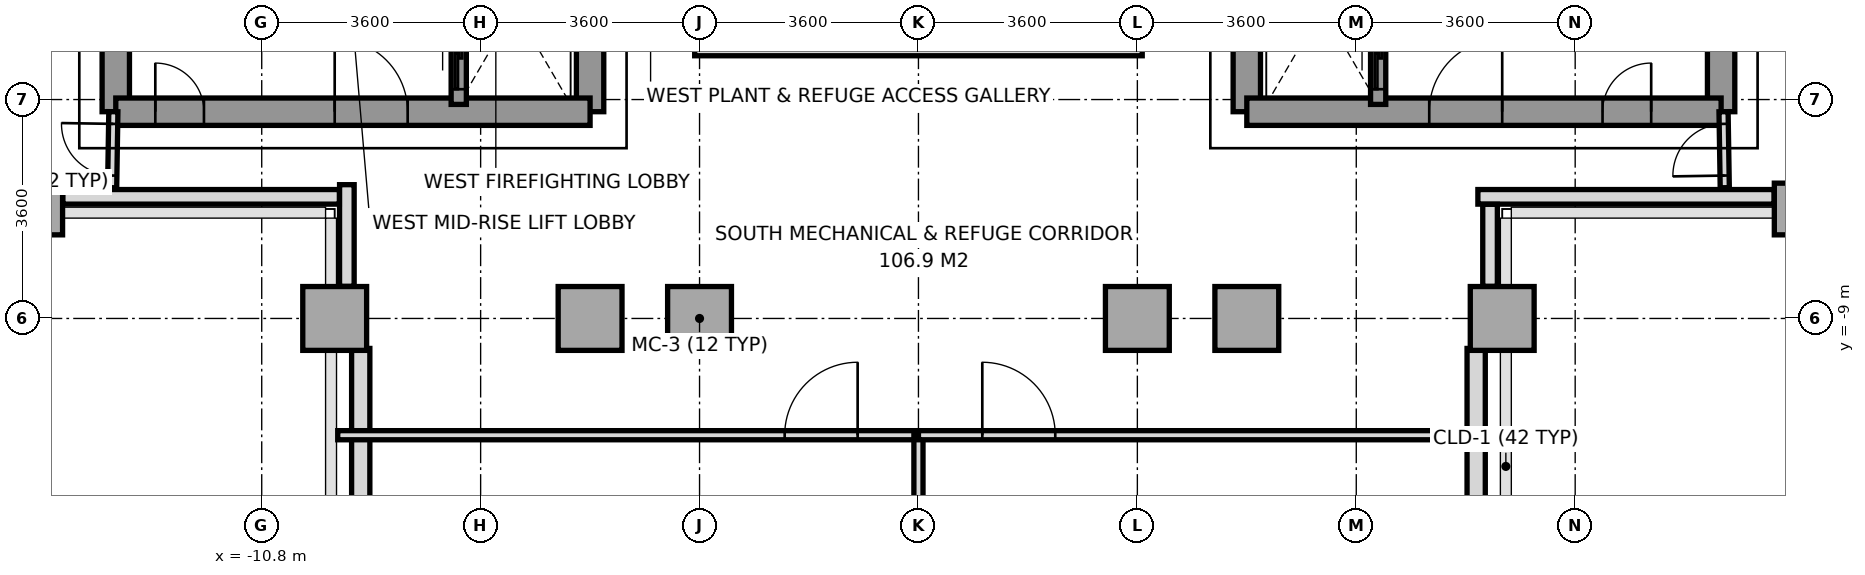
"""IFC4 building model, lengths in metres.
Left out: names, types, materials, properties, quantities, classifications, styles, units other than length and angle.
Written with IfcOpenShell. Run it as: python <this file> out.ifc"""

import sys

from ifc_helpers import new_model, si_unit, direction, frame, frame_2d, origin, origin_2d, place, context, subcontext, project, spatial, rectangle, extrude, source, transform, mapped, element, fill, save


model = new_model("IFC4")
c1 = context("Model", 3, precision=1e-05, world=origin(), true_north=direction((0.0, 1.0)))
c2 = subcontext(c1, "Body", "Model", "MODEL_VIEW")
j1 = project(units=[si_unit("LENGTHUNIT", "METRE"), si_unit("PLANEANGLEUNIT", "RADIAN")], contexts=[c1])
p1 = place(None, origin())
s1 = spatial("IfcSite", under=j1, at=p1, CompositionType="ELEMENT")
p2 = place(p1, origin())
s2 = spatial("IfcBuilding", under=s1, at=p2, CompositionType="ELEMENT")
p3 = place(p2, frame((0.0, 0.0, 151.6)))
s3 = spatial("IfcBuildingStorey", under=s2, at=p3, CompositionType="ELEMENT", Elevation=151.6)
m1 = source(origin(), c2, "Body", "SweptSolid", [
    extrude(rectangle(XDim=0.65, YDim=0.85, at=origin_2d()), origin(), (0.0, 0.0, 1.0), 4.4),
])
p4 = place(p3, frame((-14.4, -7.2, 0.0), z_axis=(0.0, 0.0, 1.0), x_axis=(1.0, 0.0, 0.0)))
e1 = element("IfcColumn", 1, at=p4, inside=s3, PredefinedType="COLUMN", context=c2, shape_type="MappedRepresentation", body=[
    mapped(m1, transform((0.0, 0.0, 0.0), x_axis=(1.0, 0.0, 0.0), y_axis=(0.0, 1.0, 0.0), z_axis=(0.0, 0.0, 1.0), scale=1.0)),
])
m2 = source(origin(), c2, "Body", "SweptSolid", [
    extrude(rectangle(XDim=1.05, YDim=1.05, at=origin_2d()), origin(), (0.0, 0.0, 1.0), 4.4),
])
for number, where, z_axis, x_axis in (
    (2, (-9.6, -9.0, 0.0), (0.0, 0.0, 1.0), (1.0, 0.0, 0.0)),
    (3, (-5.4, -9.0, 0.0), (0.0, 0.0, 1.0), (1.0, 0.0, 0.0)),
    (4, (-3.6, -9.0, 0.0), (0.0, 0.0, 1.0), (1.0, 0.0, 0.0)),
    (5, (3.6, -9.0, 0.0), (0.0, 0.0, 1.0), (1.0, 0.0, 0.0)),
    (6, (5.4, -9.0, 0.0), (0.0, 0.0, 1.0), (1.0, 0.0, 0.0)),
    (7, (9.6, -9.0, 0.0), (0.0, 0.0, 1.0), (1.0, 0.0, 0.0)),
):
    element("IfcColumn", number, at=place(p3, frame(where, z_axis=z_axis, x_axis=x_axis)), inside=s3, PredefinedType="COLUMN", context=c2, shape_type="MappedRepresentation", body=[
        mapped(m2, transform((0.0, 0.0, 0.0), x_axis=(1.0, 0.0, 0.0), y_axis=(0.0, 1.0, 0.0), z_axis=(0.0, 0.0, 1.0), scale=1.0)),
    ])
p5 = place(p3, frame((14.4, -7.2, 0.0), z_axis=(0.0, 0.0, 1.0), x_axis=(1.0, 0.0, 0.0)))
e8 = element("IfcColumn", 8, at=p5, inside=s3, PredefinedType="COLUMN", context=c2, shape_type="MappedRepresentation", body=[
    mapped(m1, transform((0.0, 0.0, 0.0), x_axis=(1.0, 0.0, 0.0), y_axis=(0.0, 1.0, 0.0), z_axis=(0.0, 0.0, 1.0), scale=1.0)),
])
for number, where, z_axis, x_axis in (
    (9, (-9.172, -9.493, 0.0), (0.0, 0.0, 1.0), (0.0, -1.0, 0.0)),
    (10, (9.172, -15.63, 0.0), (0.0, 0.0, 1.0), (0.0, 1.0, 0.0)),
):
    element("IfcWall", number, at=place(p3, frame(where, z_axis=z_axis, x_axis=x_axis)), inside=s3, PredefinedType="SOLIDWALL", context=c2, shape_type="SweptSolid", body=[
        extrude(rectangle(XDim=6.137, YDim=0.3, at=frame_2d((3.068, 0.0))), origin(), (0.0, 0.0, 1.0), 4.4),
    ])
p6 = place(p3, frame((14.072, -7.0, 0.0), z_axis=(0.0, 0.0, 1.0), x_axis=(-1.0, 0.0, 0.0)))
e11 = element("IfcWall", 11, at=p6, inside=s3, PredefinedType="PARAPET", context=c2, shape_type="SweptSolid", body=[
    extrude(rectangle(XDim=4.872, YDim=0.24, at=frame_2d((2.436, 0.0))), origin(), (0.0, 0.0, 1.0), 1.15),
])
p7 = place(p3, frame((9.4, -7.123, 0.0), z_axis=(0.0, 0.0, 1.0), x_axis=(0.0, -1.0, 0.0)))
e12 = element("IfcWall", 12, at=p7, inside=s3, PredefinedType="PARAPET", context=c2, shape_type="SweptSolid", body=[
    extrude(rectangle(XDim=1.349, YDim=0.24, at=frame_2d((0.674, 0.0))), origin(), (0.0, 0.0, 1.0), 1.15),
])
p8 = place(p3, frame((-9.4, -8.472, 0.0), z_axis=(0.0, 0.0, 1.0), x_axis=(0.0, 1.0, 0.0)))
e13 = element("IfcWall", 13, at=p8, inside=s3, PredefinedType="PARAPET", context=c2, shape_type="SweptSolid", body=[
    extrude(rectangle(XDim=1.672, YDim=0.24, at=frame_2d((0.836, 0.0))), origin(), (0.0, 0.0, 1.0), 1.15),
])
p9 = place(p3, frame((-9.523, -7.0, 0.0), z_axis=(0.0, 0.0, 1.0), x_axis=(-1.0, 0.0, 0.0)))
e14 = element("IfcWall", 14, at=p9, inside=s3, PredefinedType="PARAPET", context=c2, shape_type="SweptSolid", body=[
    extrude(rectangle(XDim=4.549, YDim=0.24, at=frame_2d((2.274, 0.0))), origin(), (0.0, 0.0, 1.0), 1.15),
])
p10 = place(p3, frame((-13.2, -5.6, 0.0), z_axis=(0.0, 0.0, 1.0), x_axis=(0.0, 1.0, 0.0)))
e15 = element("IfcWall", 15, at=p10, inside=s3, PredefinedType="SHEAR", context=c2, shape_type="SweptSolid", body=[
    extrude(rectangle(XDim=11.2, YDim=0.45, at=frame_2d((5.6, 0.0))), origin(), (0.0, 0.0, 1.0), 4.4),
])
p11 = place(p3, frame((-5.4, -5.6, 0.0), z_axis=(0.0, 0.0, 1.0), x_axis=(0.0, 1.0, 0.0)))
e16 = element("IfcWall", 16, at=p11, inside=s3, PredefinedType="SHEAR", context=c2, shape_type="SweptSolid", body=[
    extrude(rectangle(XDim=12.5, YDim=0.45, at=frame_2d((6.25, 0.0))), origin(), (0.0, 0.0, 1.0), 4.4),
])
p12 = place(p11, frame((4.55, 0.0, 0.0)))
e17 = element("IfcOpeningElement", 17, at=p12, cuts=e16, PredefinedType="OPENING", context=c2, shape_type="SweptSolid", body=[
    extrude(rectangle(XDim=1.2, YDim=2.2, at=frame_2d((0.6, 1.1))), frame((0.0, 0.235, 0.0), z_axis=(0.0, -1.0, 0.0), x_axis=(1.0, 0.0, 0.0)), (0.0, 0.0, 1.0), 0.47),
])
p13 = place(p11, frame((6.86, 0.0, 0.0)))
e18 = element("IfcOpeningElement", 18, at=p13, cuts=e16, PredefinedType="OPENING", context=c2, shape_type="SweptSolid", body=[
    extrude(rectangle(XDim=0.8, YDim=2.1, at=frame_2d((0.4, 1.05))), frame((0.0, 0.235, 0.0), z_axis=(0.0, -1.0, 0.0), x_axis=(1.0, 0.0, 0.0)), (0.0, 0.0, 1.0), 0.47),
])
p14 = place(p11, frame((7.88, 0.0, 0.0)))
e19 = element("IfcOpeningElement", 19, at=p14, cuts=e16, PredefinedType="OPENING", context=c2, shape_type="SweptSolid", body=[
    extrude(rectangle(XDim=0.8, YDim=2.1, at=frame_2d((0.4, 1.05))), frame((0.0, 0.235, 0.0), z_axis=(0.0, -1.0, 0.0), x_axis=(1.0, 0.0, 0.0)), (0.0, 0.0, 1.0), 0.47),
])
p15 = place(p3, frame((-13.2, -5.6, 0.0), z_axis=(0.0, 0.0, 1.0), x_axis=(1.0, 0.0, 0.0)))
e20 = element("IfcWall", 20, at=p15, inside=s3, PredefinedType="SHEAR", context=c2, shape_type="SweptSolid", body=[
    extrude(rectangle(XDim=7.8, YDim=0.45, at=frame_2d((3.9, 0.0))), origin(), (0.0, 0.0, 1.0), 4.4),
])
p16 = place(p15, frame((3.6, 0.0, 0.0)))
e21 = element("IfcOpeningElement", 21, at=p16, cuts=e20, PredefinedType="OPENING", context=c2, shape_type="SweptSolid", body=[
    extrude(rectangle(XDim=1.2, YDim=2.2, at=frame_2d((0.6, 1.1))), frame((0.0, 0.235, 0.0), z_axis=(0.0, -1.0, 0.0), x_axis=(1.0, 0.0, 0.0)), (0.0, 0.0, 1.0), 0.47),
])
p17 = place(p15, frame((0.65, 0.0, 0.0)))
e22 = element("IfcOpeningElement", 22, at=p17, cuts=e20, PredefinedType="OPENING", context=c2, shape_type="SweptSolid", body=[
    extrude(rectangle(XDim=0.8, YDim=2.1, at=frame_2d((0.4, 1.05))), frame((0.0, 0.235, 0.0), z_axis=(0.0, -1.0, 0.0), x_axis=(1.0, 0.0, 0.0)), (0.0, 0.0, 1.0), 0.47),
])
p18 = place(p3, frame((13.2, -5.6, 0.0), z_axis=(0.0, 0.0, 1.0), x_axis=(0.0, 1.0, 0.0)))
e23 = element("IfcWall", 23, at=p18, inside=s3, PredefinedType="SHEAR", context=c2, shape_type="SweptSolid", body=[
    extrude(rectangle(XDim=11.2, YDim=0.45, at=frame_2d((5.6, 0.0))), origin(), (0.0, 0.0, 1.0), 4.4),
])
p19 = place(p3, frame((5.4, -5.6, 0.0), z_axis=(0.0, 0.0, 1.0), x_axis=(0.0, 1.0, 0.0)))
e24 = element("IfcWall", 24, at=p19, inside=s3, PredefinedType="SHEAR", context=c2, shape_type="SweptSolid", body=[
    extrude(rectangle(XDim=12.5, YDim=0.45, at=frame_2d((6.25, 0.0))), origin(), (0.0, 0.0, 1.0), 4.4),
])
p20 = place(p19, frame((4.55, 0.0, 0.0)))
e25 = element("IfcOpeningElement", 25, at=p20, cuts=e24, PredefinedType="OPENING", context=c2, shape_type="SweptSolid", body=[
    extrude(rectangle(XDim=1.2, YDim=2.2, at=frame_2d((0.6, 1.1))), frame((0.0, 0.235, 0.0), z_axis=(0.0, -1.0, 0.0), x_axis=(1.0, 0.0, 0.0)), (0.0, 0.0, 1.0), 0.47),
])
p21 = place(p3, frame((5.4, -5.6, 0.0), z_axis=(0.0, 0.0, 1.0), x_axis=(1.0, 0.0, 0.0)))
e26 = element("IfcWall", 26, at=p21, inside=s3, PredefinedType="SHEAR", context=c2, shape_type="SweptSolid", body=[
    extrude(rectangle(XDim=7.8, YDim=0.45, at=frame_2d((3.9, 0.0))), origin(), (0.0, 0.0, 1.0), 4.4),
])
p22 = place(p21, frame((3.0, 0.0, 0.0)))
e27 = element("IfcOpeningElement", 27, at=p22, cuts=e26, PredefinedType="OPENING", context=c2, shape_type="SweptSolid", body=[
    extrude(rectangle(XDim=1.2, YDim=2.2, at=frame_2d((0.6, 1.1))), frame((0.0, 0.235, 0.0), z_axis=(0.0, -1.0, 0.0), x_axis=(1.0, 0.0, 0.0)), (0.0, 0.0, 1.0), 0.47),
])
p23 = place(p21, frame((5.85, 0.0, 0.0)))
e28 = element("IfcOpeningElement", 28, at=p23, cuts=e26, PredefinedType="OPENING", context=c2, shape_type="SweptSolid", body=[
    extrude(rectangle(XDim=0.8, YDim=2.1, at=frame_2d((0.4, 1.05))), frame((0.0, 0.235, 0.0), z_axis=(0.0, -1.0, 0.0), x_axis=(1.0, 0.0, 0.0)), (0.0, 0.0, 1.0), 0.47),
])
p24 = place(p3, frame((-7.56, -5.48, 0.0), z_axis=(0.0, 0.0, 1.0), x_axis=(0.0, 1.0, 0.0)))
e29 = element("IfcWall", 29, at=p24, inside=s3, PredefinedType="SOLIDWALL", context=c2, shape_type="SweptSolid", body=[
    extrude(rectangle(XDim=1.6, YDim=0.25, at=frame_2d((0.8, 0.0))), origin(), (0.0, 0.0, 1.0), 4.4),
])
p25 = place(p24, frame((0.25, 0.0, 0.0)))
e30 = element("IfcOpeningElement", 30, at=p25, cuts=e29, PredefinedType="OPENING", context=c2, shape_type="SweptSolid", body=[
    extrude(rectangle(XDim=1.1, YDim=2.2, at=frame_2d((0.55, 1.1))), frame((0.0, 0.135, 0.0), z_axis=(0.0, -1.0, 0.0), x_axis=(1.0, 0.0, 0.0)), (0.0, 0.0, 1.0), 0.27),
])
p26 = place(p3, frame((7.56, -5.48, 0.0), z_axis=(0.0, 0.0, 1.0), x_axis=(0.0, 1.0, 0.0)))
e31 = element("IfcWall", 31, at=p26, inside=s3, PredefinedType="SOLIDWALL", context=c2, shape_type="SweptSolid", body=[
    extrude(rectangle(XDim=1.6, YDim=0.25, at=frame_2d((0.8, 0.0))), origin(), (0.0, 0.0, 1.0), 4.4),
])
p27 = place(p26, frame((0.25, 0.0, 0.0)))
e32 = element("IfcOpeningElement", 32, at=p27, cuts=e31, PredefinedType="OPENING", context=c2, shape_type="SweptSolid", body=[
    extrude(rectangle(XDim=1.1, YDim=2.2, at=frame_2d((0.55, 1.1))), frame((0.0, 0.135, 0.0), z_axis=(0.0, -1.0, 0.0), x_axis=(1.0, 0.0, 0.0)), (0.0, 0.0, 1.0), 0.27),
])
p28 = place(p3, frame((-13.26, -6.85, 0.0), z_axis=(0.0, 0.0, 1.0), x_axis=(0.016013571389, 0.999871774545, 0.0)))
e33 = element("IfcWall", 33, at=p28, inside=s3, PredefinedType="PARTITIONING", context=c2, shape_type="SweptSolid", body=[
    extrude(rectangle(XDim=1.25, YDim=0.15, at=frame_2d((0.625, 0.0))), origin(), (0.0, 0.0, 1.0), 4.4),
])
p29 = place(p28, frame((0.2, 0.0, 0.0)))
e34 = element("IfcOpeningElement", 34, at=p29, cuts=e33, PredefinedType="OPENING", context=c2, shape_type="SweptSolid", body=[
    extrude(rectangle(XDim=0.85, YDim=2.1, at=frame_2d((0.425, 1.05))), frame((0.0, 0.085, 0.0), z_axis=(0.0, -1.0, 0.0), x_axis=(1.0, 0.0, 0.0)), (0.0, 0.0, 1.0), 0.17),
])
p30 = place(p3, frame((13.26, -6.85, 0.0), z_axis=(0.0, 0.0, 1.0), x_axis=(-0.016013571389, 0.999871774545, 0.0)))
e35 = element("IfcWall", 35, at=p30, inside=s3, PredefinedType="PARTITIONING", context=c2, shape_type="SweptSolid", body=[
    extrude(rectangle(XDim=1.25, YDim=0.15, at=frame_2d((0.625, 0.0))), origin(), (0.0, 0.0, 1.0), 4.4),
])
p31 = place(p30, frame((0.2, 0.0, 0.0)))
e36 = element("IfcOpeningElement", 36, at=p31, cuts=e35, PredefinedType="OPENING", context=c2, shape_type="SweptSolid", body=[
    extrude(rectangle(XDim=0.85, YDim=2.1, at=frame_2d((0.425, 1.05))), frame((0.0, 0.085, 0.0), z_axis=(0.0, -1.0, 0.0), x_axis=(1.0, 0.0, 0.0)), (0.0, 0.0, 1.0), 0.17),
])
p32 = place(p3, frame((-9.55, -10.92, 0.0), z_axis=(0.0, 0.0, 1.0), x_axis=(1.0, 0.0, 0.0)))
e37 = element("IfcWall", 37, at=p32, inside=s3, PredefinedType="PARTITIONING", context=c2, shape_type="SweptSolid", body=[
    extrude(rectangle(XDim=9.55, YDim=0.15, at=frame_2d((4.775, 0.0))), origin(), (0.0, 0.0, 1.0), 4.4),
])
p33 = place(p32, frame((7.35, 0.0, 0.0)))
e38 = element("IfcOpeningElement", 38, at=p33, cuts=e37, PredefinedType="OPENING", context=c2, shape_type="SweptSolid", body=[
    extrude(rectangle(XDim=1.2, YDim=2.2, at=frame_2d((0.6, 1.1))), frame((0.0, 0.085, 0.0), z_axis=(0.0, -1.0, 0.0), x_axis=(1.0, 0.0, 0.0)), (0.0, 0.0, 1.0), 0.17),
])
p34 = place(p3, frame((0.0, -24.65, 0.0), z_axis=(0.0, 0.0, 1.0), x_axis=(0.0, 1.0, 0.0)))
e39 = element("IfcWall", 39, at=p34, inside=s3, PredefinedType="PARTITIONING", context=c2, shape_type="SweptSolid", body=[
    extrude(rectangle(XDim=13.73, YDim=0.15, at=frame_2d((6.865, 0.0))), origin(), (0.0, 0.0, 1.0), 3.9),
])
p35 = place(p3, frame((0.0, -10.92, 0.0), z_axis=(0.0, 0.0, 1.0), x_axis=(1.0, 0.0, 0.0)))
e40 = element("IfcWall", 40, at=p35, inside=s3, PredefinedType="PARTITIONING", context=c2, shape_type="SweptSolid", body=[
    extrude(rectangle(XDim=9.55, YDim=0.15, at=frame_2d((4.775, 0.0))), origin(), (0.0, 0.0, 1.0), 4.4),
])
p36 = place(p35, frame((1.05, 0.0, 0.0)))
e41 = element("IfcOpeningElement", 41, at=p36, cuts=e40, PredefinedType="OPENING", context=c2, shape_type="SweptSolid", body=[
    extrude(rectangle(XDim=1.2, YDim=2.2, at=frame_2d((0.6, 1.1))), frame((0.0, 0.085, 0.0), z_axis=(0.0, -1.0, 0.0), x_axis=(1.0, 0.0, 0.0)), (0.0, 0.0, 1.0), 0.17),
])
p37 = place(p3, frame((-3.68, -4.56, 0.0), z_axis=(0.0, 0.0, 1.0), x_axis=(1.0, 0.0, 0.0)))
e42 = element("IfcWall", 42, at=p37, inside=s3, PredefinedType="PARAPET", context=c2, shape_type="SweptSolid", body=[
    extrude(rectangle(XDim=7.36, YDim=0.24, at=frame_2d((3.68, 0.0))), origin(), (0.0, 0.0, 1.0), 1.15),
])
m3 = source(origin(), c2, "Body", "SweptSolid", [
    extrude(rectangle(XDim=1.2, YDim=2.2, at=frame_2d((0.6, 1.1))), frame((0.0, 0.025, 0.0), z_axis=(0.0, -1.0, 0.0), x_axis=(1.0, 0.0, 0.0)), (0.0, 0.0, 1.0), 0.05),
])
p38 = place(p16, origin())
e43 = element("IfcDoor", 43, at=p38, inside=s3, OperationType="SINGLE_SWING_LEFT", PredefinedType="DOOR", context=c2, shape_type="MappedRepresentation", body=[
    mapped(m3, transform((0.0, 0.0, 0.0), x_axis=(1.0, 0.0, 0.0), y_axis=(0.0, 1.0, 0.0), z_axis=(0.0, 0.0, 1.0), scale=1.0)),
])
fill(e21, e43)
p39 = place(p22, origin())
e44 = element("IfcDoor", 44, at=p39, inside=s3, OperationType="SINGLE_SWING_RIGHT", PredefinedType="DOOR", context=c2, shape_type="MappedRepresentation", body=[
    mapped(m3, transform((0.0, 0.0, 0.0), x_axis=(1.0, 0.0, 0.0), y_axis=(0.0, 1.0, 0.0), z_axis=(0.0, 0.0, 1.0), scale=1.0)),
])
fill(e27, e44)
m4 = source(origin(), c2, "Body", "SweptSolid", [
    extrude(rectangle(XDim=0.8, YDim=2.1, at=frame_2d((0.4, 1.05))), frame((0.0, 0.025, 0.0), z_axis=(0.0, -1.0, 0.0), x_axis=(1.0, 0.0, 0.0)), (0.0, 0.0, 1.0), 0.05),
])
p40 = place(p17, origin())
e45 = element("IfcDoor", 45, at=p40, inside=s3, OperationType="SINGLE_SWING_LEFT", PredefinedType="DOOR", context=c2, shape_type="MappedRepresentation", body=[
    mapped(m4, transform((0.0, 0.0, 0.0), x_axis=(1.0, 0.0, 0.0), y_axis=(0.0, 1.0, 0.0), z_axis=(0.0, 0.0, 1.0), scale=1.0)),
])
fill(e22, e45)
p41 = place(p23, origin())
e46 = element("IfcDoor", 46, at=p41, inside=s3, OperationType="SINGLE_SWING_RIGHT", PredefinedType="DOOR", context=c2, shape_type="MappedRepresentation", body=[
    mapped(m4, transform((0.0, 0.0, 0.0), x_axis=(1.0, 0.0, 0.0), y_axis=(0.0, 1.0, 0.0), z_axis=(0.0, 0.0, 1.0), scale=1.0)),
])
fill(e28, e46)
m5 = source(origin(), c2, "Body", "SweptSolid", [
    extrude(rectangle(XDim=1.1, YDim=2.2, at=frame_2d((0.55, 1.1))), frame((0.0, 0.025, 0.0), z_axis=(0.0, -1.0, 0.0), x_axis=(1.0, 0.0, 0.0)), (0.0, 0.0, 1.0), 0.05),
])
p42 = place(p25, origin())
e47 = element("IfcDoor", 47, at=p42, inside=s3, OperationType="SLIDING_TO_LEFT", PredefinedType="DOOR", context=c2, shape_type="MappedRepresentation", body=[
    mapped(m5, transform((0.0, 0.0, 0.0), x_axis=(1.0, 0.0, 0.0), y_axis=(0.0, 1.0, 0.0), z_axis=(0.0, 0.0, 1.0), scale=1.0)),
])
fill(e30, e47)
p43 = place(p27, origin())
e48 = element("IfcDoor", 48, at=p43, inside=s3, OperationType="SLIDING_TO_LEFT", PredefinedType="DOOR", context=c2, shape_type="MappedRepresentation", body=[
    mapped(m5, transform((0.0, 0.0, 0.0), x_axis=(1.0, 0.0, 0.0), y_axis=(0.0, 1.0, 0.0), z_axis=(0.0, 0.0, 1.0), scale=1.0)),
])
fill(e32, e48)
m6 = source(origin(), c2, "Body", "SweptSolid", [
    extrude(rectangle(XDim=0.85, YDim=2.1, at=frame_2d((0.425, 1.05))), frame((0.0, 0.025, 0.0), z_axis=(0.0, -1.0, 0.0), x_axis=(1.0, 0.0, 0.0)), (0.0, 0.0, 1.0), 0.05),
])
p44 = place(p29, origin())
e49 = element("IfcDoor", 49, at=p44, inside=s3, OperationType="SINGLE_SWING_RIGHT", PredefinedType="DOOR", context=c2, shape_type="MappedRepresentation", body=[
    mapped(m6, transform((0.0, 0.0, 0.0), x_axis=(1.0, 0.0, 0.0), y_axis=(0.0, 1.0, 0.0), z_axis=(0.0, 0.0, 1.0), scale=1.0)),
])
fill(e34, e49)
p45 = place(p31, origin())
e50 = element("IfcDoor", 50, at=p45, inside=s3, OperationType="SINGLE_SWING_LEFT", PredefinedType="DOOR", context=c2, shape_type="MappedRepresentation", body=[
    mapped(m6, transform((0.0, 0.0, 0.0), x_axis=(1.0, 0.0, 0.0), y_axis=(0.0, 1.0, 0.0), z_axis=(0.0, 0.0, 1.0), scale=1.0)),
])
fill(e36, e50)
p46 = place(p33, origin())
e51 = element("IfcDoor", 51, at=p46, inside=s3, OperationType="SINGLE_SWING_RIGHT", PredefinedType="DOOR", context=c2, shape_type="MappedRepresentation", body=[
    mapped(m3, transform((0.0, 0.0, 0.0), x_axis=(1.0, 0.0, 0.0), y_axis=(0.0, 1.0, 0.0), z_axis=(0.0, 0.0, 1.0), scale=1.0)),
])
fill(e38, e51)
p47 = place(p36, origin())
e52 = element("IfcDoor", 52, at=p47, inside=s3, OperationType="SINGLE_SWING_LEFT", PredefinedType="DOOR", context=c2, shape_type="MappedRepresentation", body=[
    mapped(m3, transform((0.0, 0.0, 0.0), x_axis=(1.0, 0.0, 0.0), y_axis=(0.0, 1.0, 0.0), z_axis=(0.0, 0.0, 1.0), scale=1.0)),
])
fill(e41, e52)
save(model, sys.argv[1])
